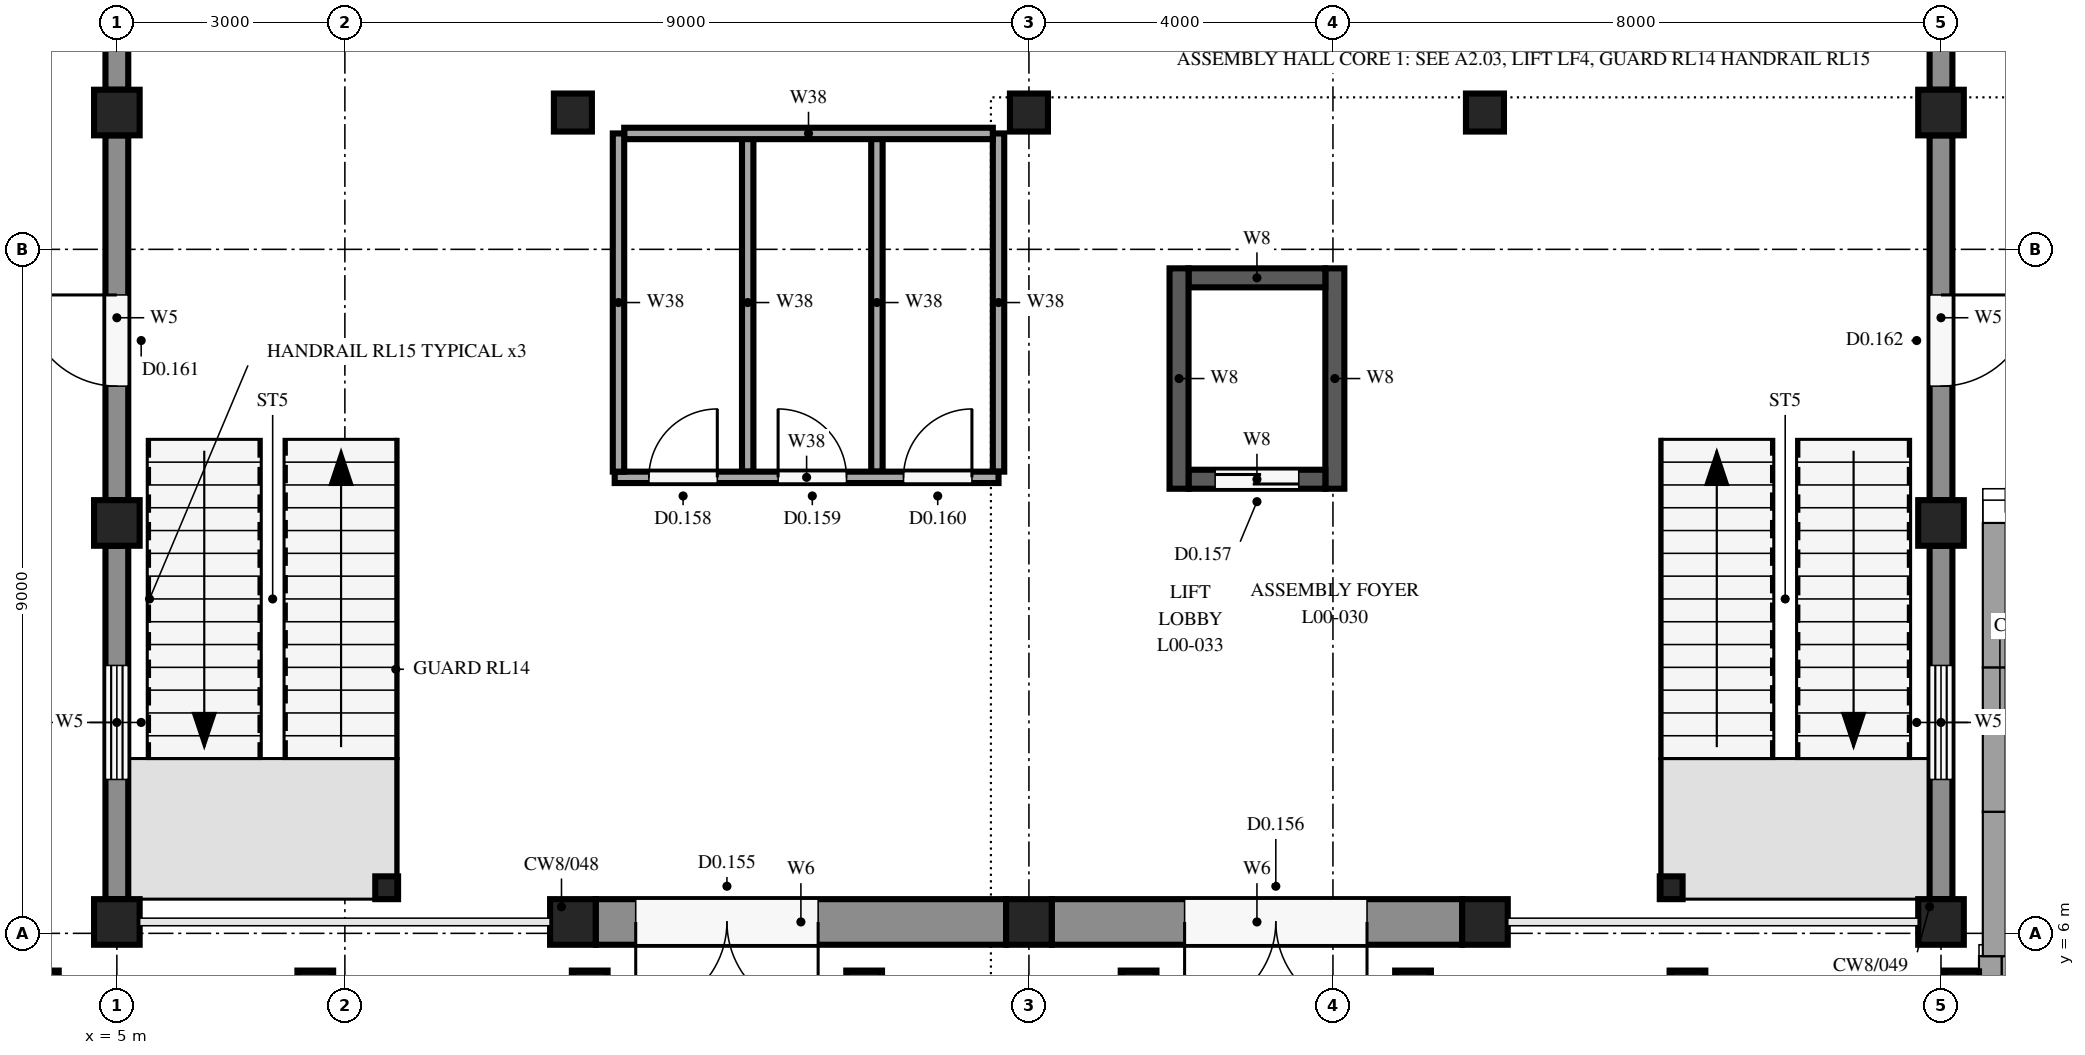
"""IFC4 building model, lengths in metres.
Left out: names, types, materials, properties, quantities, classifications, styles, units other than length and angle.
Written with IfcOpenShell. Run it as: python <this file> out.ifc"""

import sys

from ifc_helpers import new_model, si_unit, direction, frame, frame_2d, origin, origin_2d, place, context, subcontext, project, spatial, rectangle, extrude, element, fill, save


model = new_model("IFC4")
c1 = context("Model", 3, precision=1e-05, world=origin(), true_north=direction((0.0, 1.0)))
c2 = subcontext(c1, "Body", "Model", "MODEL_VIEW")
j1 = project(units=[si_unit("LENGTHUNIT", "METRE"), si_unit("PLANEANGLEUNIT", "RADIAN")], contexts=[c1])
p1 = place(None, origin())
s1 = spatial("IfcSite", under=j1, at=p1, CompositionType="ELEMENT")
p2 = place(p1, origin())
s2 = spatial("IfcBuilding", under=s1, at=p2, CompositionType="ELEMENT")
p3 = place(p2, origin())
s3 = spatial("IfcBuildingStorey", under=s2, at=p3, CompositionType="ELEMENT", Elevation=0.0)
for number, where, z_axis, x_axis in (
    (1, (5.0, 6.15, 0.0), (0.0, 0.0, 1.0), (1.0, 0.0, 0.0)),
    (2, (5.0, 11.4, 0.0), (0.0, 0.0, 1.0), (1.0, 0.0, 0.0)),
    (3, (5.0, 16.8, 0.0), (0.0, 0.0, 1.0), (1.0, 0.0, 0.0)),
    (4, (11.0, 6.15, 0.0), (0.0, 0.0, 1.0), (1.0, 0.0, 0.0)),
    (5, (17.0, 6.15, 0.0), (0.0, 0.0, 1.0), (1.0, 0.0, 0.0)),
    (6, (23.0, 6.15, 0.0), (0.0, 0.0, 1.0), (1.0, 0.0, 0.0)),
    (7, (29.0, 6.15, 0.0), (0.0, 0.0, 1.0), (1.0, 0.0, 0.0)),
    (8, (29.0, 11.4, 0.0), (0.0, 0.0, 1.0), (1.0, 0.0, 0.0)),
    (9, (29.0, 16.8, 0.0), (0.0, 0.0, 1.0), (1.0, 0.0, 0.0)),
):
    element("IfcColumn", number, at=place(p3, frame(where, z_axis=z_axis, x_axis=x_axis)), inside=s3, PredefinedType="COLUMN", context=c2, shape_type="SweptSolid", body=[
        extrude(rectangle(XDim=0.6, YDim=0.6, at=origin_2d()), origin(), (0.0, 0.0, 1.0), 4.5),
    ])
p4 = place(p3, frame((5.0, 6.45, 0.0), z_axis=(0.0, 0.0, 1.0), x_axis=(0.0, 1.0, 0.0)))
e10 = element("IfcWall", 10, at=p4, inside=s3, PredefinedType="SOLIDWALL", context=c2, shape_type="SweptSolid", body=[
    extrude(rectangle(XDim=4.65, YDim=0.3, at=frame_2d((2.325, 0.0))), origin(), (0.0, 0.0, 1.0), 4.5),
])
p5 = place(p4, frame((1.575, 0.0, 0.6)))
e11 = element("IfcOpeningElement", 11, at=p5, cuts=e10, PredefinedType="OPENING", context=c2, shape_type="SweptSolid", body=[
    extrude(rectangle(XDim=1.5, YDim=3.2, at=frame_2d((0.75, 1.6))), frame((0.0, 0.16, 0.0), z_axis=(0.0, -1.0, 0.0), x_axis=(1.0, 0.0, 0.0)), (0.0, 0.0, 1.0), 0.32),
])
p6 = place(p3, frame((5.0, 11.7, 0.0), z_axis=(0.0, 0.0, 1.0), x_axis=(0.0, 1.0, 0.0)))
e12 = element("IfcWall", 12, at=p6, inside=s3, PredefinedType="SOLIDWALL", context=c2, shape_type="SweptSolid", body=[
    extrude(rectangle(XDim=4.8, YDim=0.3, at=frame_2d((2.4, 0.0))), origin(), (0.0, 0.0, 1.0), 4.5),
])
p7 = place(p6, frame((1.5, 0.0, 0.0)))
e13 = element("IfcOpeningElement", 13, at=p7, cuts=e12, PredefinedType="OPENING", context=c2, shape_type="SweptSolid", body=[
    extrude(rectangle(XDim=1.2, YDim=2.4, at=frame_2d((0.6, 1.2))), frame((0.0, 0.16, 0.0), z_axis=(0.0, -1.0, 0.0), x_axis=(1.0, 0.0, 0.0)), (0.0, 0.0, 1.0), 0.32),
])
p8 = place(p3, frame((5.0, 17.1, 0.0), z_axis=(0.0, 0.0, 1.0), x_axis=(0.0, 1.0, 0.0)))
e14 = element("IfcWall", 14, at=p8, inside=s3, PredefinedType="SOLIDWALL", context=c2, shape_type="SweptSolid", body=[
    extrude(rectangle(XDim=4.8, YDim=0.3, at=frame_2d((2.4, 0.0))), origin(), (0.0, 0.0, 1.0), 4.5),
])
p9 = place(p8, frame((1.2, 0.0, 0.0)))
e15 = element("IfcOpeningElement", 15, at=p9, cuts=e14, PredefinedType="OPENING", context=c2, shape_type="SweptSolid", body=[
    extrude(rectangle(XDim=2.4, YDim=2.4, at=frame_2d((1.2, 1.2))), frame((0.0, 0.16, 0.0), z_axis=(0.0, -1.0, 0.0), x_axis=(1.0, 0.0, 0.0)), (0.0, 0.0, 1.0), 0.32),
])
p10 = place(p3, frame((29.0, 11.1, 0.0), z_axis=(0.0, 0.0, 1.0), x_axis=(0.0, -1.0, 0.0)))
e16 = element("IfcWall", 16, at=p10, inside=s3, PredefinedType="SOLIDWALL", context=c2, shape_type="SweptSolid", body=[
    extrude(rectangle(XDim=4.65, YDim=0.3, at=frame_2d((2.325, 0.0))), origin(), (0.0, 0.0, 1.0), 4.5),
])
p11 = place(p10, frame((1.575, 0.0, 0.6)))
e17 = element("IfcOpeningElement", 17, at=p11, cuts=e16, PredefinedType="OPENING", context=c2, shape_type="SweptSolid", body=[
    extrude(rectangle(XDim=1.5, YDim=3.2, at=frame_2d((0.75, 1.6))), frame((0.0, 0.16, 0.0), z_axis=(0.0, -1.0, 0.0), x_axis=(1.0, 0.0, 0.0)), (0.0, 0.0, 1.0), 0.32),
])
p12 = place(p3, frame((29.0, 16.5, 0.0), z_axis=(0.0, 0.0, 1.0), x_axis=(0.0, -1.0, 0.0)))
e18 = element("IfcWall", 18, at=p12, inside=s3, PredefinedType="SOLIDWALL", context=c2, shape_type="SweptSolid", body=[
    extrude(rectangle(XDim=4.8, YDim=0.3, at=frame_2d((2.4, 0.0))), origin(), (0.0, 0.0, 1.0), 4.5),
])
p13 = place(p12, frame((2.1, 0.0, 0.0)))
e19 = element("IfcOpeningElement", 19, at=p13, cuts=e18, PredefinedType="OPENING", context=c2, shape_type="SweptSolid", body=[
    extrude(rectangle(XDim=1.2, YDim=2.4, at=frame_2d((0.6, 1.2))), frame((0.0, 0.16, 0.0), z_axis=(0.0, -1.0, 0.0), x_axis=(1.0, 0.0, 0.0)), (0.0, 0.0, 1.0), 0.32),
])
p14 = place(p3, frame((29.0, 21.9, 0.0), z_axis=(0.0, 0.0, 1.0), x_axis=(0.0, -1.0, 0.0)))
e20 = element("IfcWall", 20, at=p14, inside=s3, PredefinedType="SOLIDWALL", context=c2, shape_type="SweptSolid", body=[
    extrude(rectangle(XDim=4.8, YDim=0.3, at=frame_2d((2.4, 0.0))), origin(), (0.0, 0.0, 1.0), 4.5),
])
p15 = place(p14, frame((1.2, 0.0, 0.0)))
e21 = element("IfcOpeningElement", 21, at=p15, cuts=e20, PredefinedType="OPENING", context=c2, shape_type="SweptSolid", body=[
    extrude(rectangle(XDim=2.4, YDim=2.4, at=frame_2d((1.2, 1.2))), frame((0.0, 0.16, 0.0), z_axis=(0.0, -1.0, 0.0), x_axis=(1.0, 0.0, 0.0)), (0.0, 0.0, 1.0), 0.32),
])
p16 = place(p3, frame((16.7, 6.15, 0.0), z_axis=(0.0, 0.0, 1.0), x_axis=(-1.0, 0.0, 0.0)))
e22 = element("IfcWall", 22, at=p16, inside=s3, PredefinedType="SOLIDWALL", context=c2, shape_type="SweptSolid", body=[
    extrude(rectangle(XDim=5.4, YDim=0.6, at=frame_2d((2.7, 0.0))), origin(), (0.0, 0.0, 1.0), 4.5),
])
p17 = place(p16, frame((2.473, 0.0, 0.0)))
e23 = element("IfcOpeningElement", 23, at=p17, cuts=e22, PredefinedType="OPENING", context=c2, shape_type="SweptSolid", body=[
    extrude(rectangle(XDim=2.4, YDim=2.4, at=frame_2d((1.2, 1.2))), frame((0.0, 0.31, 0.0), z_axis=(0.0, -1.0, 0.0), x_axis=(1.0, 0.0, 0.0)), (0.0, 0.0, 1.0), 0.62),
])
p18 = place(p3, frame((22.7, 6.15, 0.0), z_axis=(0.0, 0.0, 1.0), x_axis=(-1.0, 0.0, 0.0)))
e24 = element("IfcWall", 24, at=p18, inside=s3, PredefinedType="SOLIDWALL", context=c2, shape_type="SweptSolid", body=[
    extrude(rectangle(XDim=5.4, YDim=0.6, at=frame_2d((2.7, 0.0))), origin(), (0.0, 0.0, 1.0), 4.5),
])
p19 = place(p18, frame((1.252, 0.0, 0.0)))
e25 = element("IfcOpeningElement", 25, at=p19, cuts=e24, PredefinedType="OPENING", context=c2, shape_type="SweptSolid", body=[
    extrude(rectangle(XDim=2.4, YDim=2.4, at=frame_2d((1.2, 1.2))), frame((0.0, 0.31, 0.0), z_axis=(0.0, -1.0, 0.0), x_axis=(1.0, 0.0, 0.0)), (0.0, 0.0, 1.0), 0.62),
])
for number, where, z_axis, x_axis in (
    (26, (18.975, 11.85, -1.6), (0.0, 0.0, 1.0), (0.0, 1.0, 0.0)),
    (27, (21.025, 11.85, -1.6), (0.0, 0.0, 1.0), (0.0, 1.0, 0.0)),
):
    element("IfcWall", number, at=place(p3, frame(where, z_axis=z_axis, x_axis=x_axis)), inside=s3, PredefinedType="SHEAR", context=c2, shape_type="SweptSolid", body=[
        extrude(rectangle(XDim=2.9, YDim=0.25, at=frame_2d((1.45, 0.0))), origin(), (0.0, 0.0, 1.0), 6.1),
    ])
p20 = place(p3, frame((19.1, 11.975, -1.6), z_axis=(0.0, 0.0, 1.0), x_axis=(1.0, 0.0, 0.0)))
e28 = element("IfcWall", 28, at=p20, inside=s3, PredefinedType="SHEAR", context=c2, shape_type="SweptSolid", body=[
    extrude(rectangle(XDim=1.8, YDim=0.25, at=frame_2d((0.9, 0.0))), origin(), (0.0, 0.0, 1.0), 6.1),
])
p21 = place(p20, frame((0.35, 0.0, 1.6)))
e29 = element("IfcOpeningElement", 29, at=p21, cuts=e28, PredefinedType="OPENING", context=c2, shape_type="SweptSolid", body=[
    extrude(rectangle(XDim=1.1, YDim=2.1, at=frame_2d((0.55, 1.05))), frame((0.0, 0.135, 0.0), z_axis=(0.0, -1.0, 0.0), x_axis=(1.0, 0.0, 0.0)), (0.0, 0.0, 1.0), 0.27),
])
p22 = place(p3, frame((19.1, 14.625, -1.6), z_axis=(0.0, 0.0, 1.0), x_axis=(1.0, 0.0, 0.0)))
e30 = element("IfcWall", 30, at=p22, inside=s3, PredefinedType="SHEAR", context=c2, shape_type="SweptSolid", body=[
    extrude(rectangle(XDim=1.8, YDim=0.25, at=frame_2d((0.9, 0.0))), origin(), (0.0, 0.0, 1.0), 6.1),
])
for number, where, z_axis, x_axis in (
    (31, (11.0, 16.8, 0.0), (0.0, 0.0, 1.0), (1.0, 0.0, 0.0)),
    (32, (17.0, 16.8, 0.0), (0.0, 0.0, 1.0), (1.0, 0.0, 0.0)),
    (33, (23.0, 16.8, 0.0), (0.0, 0.0, 1.0), (1.0, 0.0, 0.0)),
):
    element("IfcColumn", number, at=place(p3, frame(where, z_axis=z_axis, x_axis=x_axis)), inside=s3, PredefinedType="COLUMN", context=c2, shape_type="SweptSolid", body=[
        extrude(rectangle(XDim=0.5, YDim=0.5, at=origin_2d()), origin(), (0.0, 0.0, 1.0), 4.2),
    ])
for number, where, z_axis, x_axis in (
    (34, (4.0, 5.275, -0.3), (0.0, 0.0, 1.0), (1.0, 0.0, 0.0)),
    (35, (7.611, 5.275, -0.3), (0.0, 0.0, 1.0), (1.0, 0.0, 0.0)),
    (36, (11.221, 5.275, -0.3), (0.0, 0.0, 1.0), (1.0, 0.0, 0.0)),
    (37, (14.832, 5.275, -0.3), (0.0, 0.0, 1.0), (1.0, 0.0, 0.0)),
    (38, (18.443, 5.275, -0.3), (0.0, 0.0, 1.0), (1.0, 0.0, 0.0)),
    (39, (22.054, 5.275, -0.3), (0.0, 0.0, 1.0), (1.0, 0.0, 0.0)),
    (40, (25.664, 5.275, -0.3), (0.0, 0.0, 1.0), (1.0, 0.0, 0.0)),
    (41, (29.275, 5.275, -0.3), (0.0, 0.0, 1.0), (1.0, 0.0, 0.0)),
):
    element("IfcColumn", number, at=place(p3, frame(where, z_axis=z_axis, x_axis=x_axis)), inside=s3, PredefinedType="COLUMN", context=c2, shape_type="SweptSolid", body=[
        extrude(rectangle(XDim=0.45, YDim=0.45, at=origin_2d()), origin(), (0.0, 0.0, 1.0), 3.95),
    ])
for number, where, z_axis, x_axis in (
    (42, (8.55, 6.6, 0.0), (0.0, 0.0, 1.0), (1.0, 0.0, 0.0)),
    (43, (25.45, 6.6, 0.0), (0.0, 0.0, 1.0), (1.0, 0.0, 0.0)),
):
    element("IfcColumn", number, at=place(p3, frame(where, z_axis=z_axis, x_axis=x_axis)), inside=s3, PredefinedType="COLUMN", context=c2, shape_type="SweptSolid", body=[
        extrude(rectangle(XDim=0.3, YDim=0.3, at=origin_2d()), origin(), (0.0, 0.0, 1.0), 2.05),
    ])
p23 = place(p3, frame((11.55, 12.0, 0.0), z_axis=(0.0, 0.0, 1.0), x_axis=(1.0, 0.0, 0.0)))
e44 = element("IfcWall", 44, at=p23, inside=s3, PredefinedType="PARTITIONING", context=c2, shape_type="SweptSolid", body=[
    extrude(rectangle(XDim=5.05, YDim=0.15, at=frame_2d((2.525, 0.0))), origin(), (0.0, 0.0, 1.0), 4.2),
])
p24 = place(p23, frame((0.45, 0.0, 0.0)))
e45 = element("IfcOpeningElement", 45, at=p24, cuts=e44, PredefinedType="OPENING", context=c2, shape_type="SweptSolid", body=[
    extrude(rectangle(XDim=0.9, YDim=2.1, at=frame_2d((0.45, 1.05))), frame((0.0, 0.085, 0.0), z_axis=(0.0, -1.0, 0.0), x_axis=(1.0, 0.0, 0.0)), (0.0, 0.0, 1.0), 0.17),
])
p25 = place(p23, frame((2.15, 0.0, 0.0)))
e46 = element("IfcOpeningElement", 46, at=p25, cuts=e44, PredefinedType="OPENING", context=c2, shape_type="SweptSolid", body=[
    extrude(rectangle(XDim=0.9, YDim=2.1, at=frame_2d((0.45, 1.05))), frame((0.0, 0.085, 0.0), z_axis=(0.0, -1.0, 0.0), x_axis=(1.0, 0.0, 0.0)), (0.0, 0.0, 1.0), 0.17),
])
p26 = place(p23, frame((3.8, 0.0, 0.0)))
e47 = element("IfcOpeningElement", 47, at=p26, cuts=e44, PredefinedType="OPENING", context=c2, shape_type="SweptSolid", body=[
    extrude(rectangle(XDim=0.9, YDim=2.1, at=frame_2d((0.45, 1.05))), frame((0.0, 0.085, 0.0), z_axis=(0.0, -1.0, 0.0), x_axis=(1.0, 0.0, 0.0)), (0.0, 0.0, 1.0), 0.17),
])
for number, where, z_axis, x_axis in (
    (48, (11.6, 12.075, 0.0), (0.0, 0.0, 1.0), (0.0, 1.0, 0.0)),
    (49, (16.6, 12.075, 0.0), (0.0, 0.0, 1.0), (0.0, 1.0, 0.0)),
):
    element("IfcWall", number, at=place(p3, frame(where, z_axis=z_axis, x_axis=x_axis)), inside=s3, PredefinedType="PARTITIONING", context=c2, shape_type="SweptSolid", body=[
        extrude(rectangle(XDim=4.45, YDim=0.15, at=frame_2d((2.225, 0.0))), origin(), (0.0, 0.0, 1.0), 4.2),
    ])
p27 = place(p3, frame((11.675, 16.525, 0.0), z_axis=(0.0, 0.0, 1.0), x_axis=(1.0, 0.0, 0.0)))
e50 = element("IfcWall", 50, at=p27, inside=s3, PredefinedType="PARTITIONING", context=c2, shape_type="SweptSolid", body=[
    extrude(rectangle(XDim=4.85, YDim=0.15, at=frame_2d((2.425, 0.0))), origin(), (0.0, 0.0, 1.0), 4.2),
])
for number, where, z_axis, x_axis in (
    (51, (13.3, 12.075, 0.0), (0.0, 0.0, 1.0), (0.0, 1.0, 0.0)),
    (52, (15.0, 12.075, 0.0), (0.0, 0.0, 1.0), (0.0, 1.0, 0.0)),
):
    element("IfcWall", number, at=place(p3, frame(where, z_axis=z_axis, x_axis=x_axis)), inside=s3, PredefinedType="PARTITIONING", context=c2, shape_type="SweptSolid", body=[
        extrude(rectangle(XDim=4.45, YDim=0.15, at=frame_2d((2.225, 0.0))), origin(), (0.0, 0.0, 1.0), 4.2),
    ])
p28 = place(p17, origin())
e53 = element("IfcDoor", 53, at=p28, inside=s3, OperationType="DOUBLE_DOOR_SINGLE_SWING", PredefinedType="NOTDEFINED", context=c2, shape_type="SweptSolid", body=[
    extrude(rectangle(XDim=2.4, YDim=2.4, at=frame_2d((1.2, 1.2))), frame((0.0, 0.025, 0.0), z_axis=(0.0, -1.0, 0.0), x_axis=(1.0, 0.0, 0.0)), (0.0, 0.0, 1.0), 0.05),
])
fill(e23, e53)
p29 = place(p19, origin())
e54 = element("IfcDoor", 54, at=p29, inside=s3, OperationType="DOUBLE_DOOR_SINGLE_SWING", PredefinedType="NOTDEFINED", context=c2, shape_type="SweptSolid", body=[
    extrude(rectangle(XDim=2.4, YDim=2.4, at=frame_2d((1.2, 1.2))), frame((0.0, 0.025, 0.0), z_axis=(0.0, -1.0, 0.0), x_axis=(1.0, 0.0, 0.0)), (0.0, 0.0, 1.0), 0.05),
])
fill(e25, e54)
p30 = place(p5, origin())
e55 = element("IfcWindow", 55, at=p30, inside=s3, PartitioningType="SINGLE_PANEL", PredefinedType="WINDOW", context=c2, shape_type="SweptSolid", body=[
    extrude(rectangle(XDim=1.5, YDim=3.2, at=frame_2d((0.75, 1.6))), frame((0.0, 0.03, 0.0), z_axis=(0.0, -1.0, 0.0), x_axis=(1.0, 0.0, 0.0)), (0.0, 0.0, 1.0), 0.06),
])
fill(e11, e55)
p31 = place(p7, origin())
e56 = element("IfcDoor", 56, at=p31, inside=s3, OperationType="SINGLE_SWING_RIGHT", PredefinedType="NOTDEFINED", context=c2, shape_type="SweptSolid", body=[
    extrude(rectangle(XDim=1.2, YDim=2.4, at=frame_2d((0.6, 1.2))), frame((0.0, 0.025, 0.0), z_axis=(0.0, -1.0, 0.0), x_axis=(1.0, 0.0, 0.0)), (0.0, 0.0, 1.0), 0.05),
])
fill(e13, e56)
p32 = place(p11, origin())
e57 = element("IfcWindow", 57, at=p32, inside=s3, PartitioningType="SINGLE_PANEL", PredefinedType="WINDOW", context=c2, shape_type="SweptSolid", body=[
    extrude(rectangle(XDim=1.5, YDim=3.2, at=frame_2d((0.75, 1.6))), frame((0.0, 0.03, 0.0), z_axis=(0.0, -1.0, 0.0), x_axis=(1.0, 0.0, 0.0)), (0.0, 0.0, 1.0), 0.06),
])
fill(e17, e57)
p33 = place(p13, origin())
e58 = element("IfcDoor", 58, at=p33, inside=s3, OperationType="SINGLE_SWING_LEFT", PredefinedType="NOTDEFINED", context=c2, shape_type="SweptSolid", body=[
    extrude(rectangle(XDim=1.2, YDim=2.4, at=frame_2d((0.6, 1.2))), frame((0.0, 0.025, 0.0), z_axis=(0.0, -1.0, 0.0), x_axis=(1.0, 0.0, 0.0)), (0.0, 0.0, 1.0), 0.05),
])
fill(e19, e58)
p34 = place(p24, origin())
e59 = element("IfcDoor", 59, at=p34, inside=s3, OperationType="SINGLE_SWING_RIGHT", PredefinedType="NOTDEFINED", context=c2, shape_type="SweptSolid", body=[
    extrude(rectangle(XDim=0.9, YDim=2.1, at=frame_2d((0.45, 1.05))), frame((0.0, 0.025, 0.0), z_axis=(0.0, -1.0, 0.0), x_axis=(1.0, 0.0, 0.0)), (0.0, 0.0, 1.0), 0.05),
])
fill(e45, e59)
p35 = place(p25, origin())
e60 = element("IfcDoor", 60, at=p35, inside=s3, OperationType="SINGLE_SWING_LEFT", PredefinedType="NOTDEFINED", context=c2, shape_type="SweptSolid", body=[
    extrude(rectangle(XDim=0.9, YDim=2.1, at=frame_2d((0.45, 1.05))), frame((0.0, 0.025, 0.0), z_axis=(0.0, -1.0, 0.0), x_axis=(1.0, 0.0, 0.0)), (0.0, 0.0, 1.0), 0.05),
])
fill(e46, e60)
p36 = place(p26, origin())
e61 = element("IfcDoor", 61, at=p36, inside=s3, OperationType="SINGLE_SWING_RIGHT", PredefinedType="NOTDEFINED", context=c2, shape_type="SweptSolid", body=[
    extrude(rectangle(XDim=0.9, YDim=2.1, at=frame_2d((0.45, 1.05))), frame((0.0, 0.025, 0.0), z_axis=(0.0, -1.0, 0.0), x_axis=(1.0, 0.0, 0.0)), (0.0, 0.0, 1.0), 0.05),
])
fill(e47, e61)
p37 = place(p21, origin())
e62 = element("IfcDoor", 62, at=p37, inside=s3, OperationType="SLIDING_TO_LEFT", PredefinedType="NOTDEFINED", context=c2, shape_type="SweptSolid", body=[
    extrude(rectangle(XDim=1.1, YDim=2.1, at=frame_2d((0.55, 1.05))), frame((0.0, 0.025, 0.0), z_axis=(0.0, -1.0, 0.0), x_axis=(1.0, 0.0, 0.0)), (0.0, 0.0, 1.0), 0.05),
])
fill(e29, e62)
save(model, sys.argv[1])
